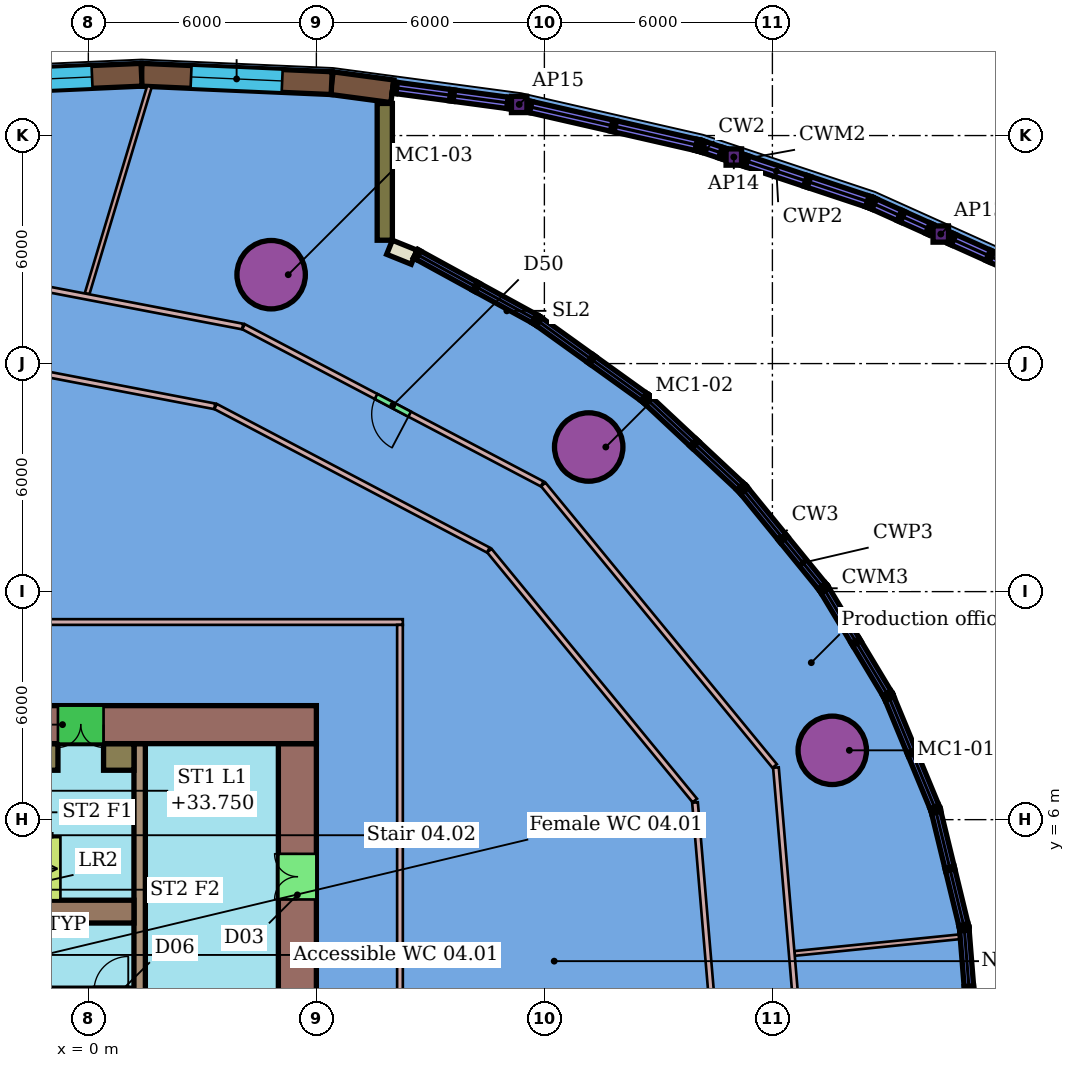
"""IFC4 building model, lengths in metres.
Left out: names, types, materials, properties, quantities, classifications, styles, units other than length and angle.
Written with IfcOpenShell. Run it as: python <this file> out.ifc"""

import sys

from ifc_helpers import new_model, si_unit, direction, frame, frame_2d, origin, origin_2d, place, context, subcontext, project, spatial, rectangle, hollow_circle, i_section, extrude, element, fill, save


model = new_model("IFC4")
c1 = context("Model", 3, precision=1e-05, world=origin(), true_north=direction((0.0, 1.0)))
c2 = subcontext(c1, "Body", "Model", "MODEL_VIEW")
j1 = project(units=[si_unit("LENGTHUNIT", "METRE"), si_unit("PLANEANGLEUNIT", "RADIAN")], contexts=[c1])
p1 = place(None, origin())
s1 = spatial("IfcSite", under=j1, at=p1, CompositionType="ELEMENT")
p2 = place(p1, origin())
s2 = spatial("IfcBuilding", under=s1, at=p2, CompositionType="ELEMENT")
p3 = place(p2, frame((0.0, 0.0, 31.5)))
s3 = spatial("IfcBuildingStorey", under=s2, at=p3, CompositionType="ELEMENT", Elevation=31.5)
for number, where, z_axis, x_axis in (
    (1, (19.575, 7.824, 0.0), (0.0, 0.0, 1.0), (1.0, 0.0, 0.0)),
    (2, (13.166, 15.805, 0.0), (0.0, 0.0, 1.0), (1.0, 0.0, 0.0)),
    (3, (4.81, 20.339, 0.0), (0.0, 0.0, 1.0), (1.0, 0.0, 0.0)),
):
    element("IfcColumn", number, at=place(p3, frame(where, z_axis=z_axis, x_axis=x_axis)), inside=s3, PredefinedType="COLUMN", context=c2, shape_type="SweptSolid", body=[
        extrude(hollow_circle(Radius=0.9, WallThickness=0.06, at=origin_2d()), origin(), (0.0, 0.0, 1.0), 4.35),
    ])
for number, where, z_axis, x_axis in (
    (4, (22.431, 21.409, 0.0), (0.0, 0.0, 1.0), (1.0, 0.0, 0.0)),
    (5, (16.985, 23.435, 0.0), (0.0, 0.0, 1.0), (1.0, 0.0, 0.0)),
    (6, (11.337, 24.819, 0.0), (0.0, 0.0, 1.0), (1.0, 0.0, 0.0)),
):
    element("IfcColumn", number, at=place(p3, frame(where, z_axis=z_axis, x_axis=x_axis)), inside=s3, PredefinedType="COLUMN", context=c2, shape_type="SweptSolid", body=[
        extrude(i_section(OverallWidth=0.407, OverallDepth=0.428, WebThickness=0.02, FlangeThickness=0.035, at=origin_2d()), origin(), (0.0, 0.0, 1.0), 4.35),
    ])
p4 = place(p3, frame((-18.075, 11.2, 0.0), z_axis=(0.0, 0.0, 1.0), x_axis=(1.0, 0.0, 0.0)))
e7 = element("IfcWall", 7, at=p4, inside=s3, PredefinedType="PARTITIONING", context=c2, shape_type="SweptSolid", body=[
    extrude(rectangle(XDim=26.35, YDim=0.15, at=frame_2d((13.175, 0.0))), origin(), (0.0, 0.0, 1.0), 3.9),
])
p5 = place(p3, frame((8.2, -13.105, 0.0), z_axis=(0.0, 0.0, 1.0), x_axis=(0.0, 1.0, 0.0)))
e8 = element("IfcWall", 8, at=p5, inside=s3, PredefinedType="PARTITIONING", context=c2, shape_type="SweptSolid", body=[
    extrude(rectangle(XDim=24.23, YDim=0.15, at=frame_2d((12.115, 0.0))), origin(), (0.0, 0.0, 1.0), 3.9),
])
p6 = place(p3, frame((-4.114, 18.298, 0.0), z_axis=(0.0, 0.0, 1.0), x_axis=(0.982205706766, -0.187808278828, 0.0)))
e9 = element("IfcWall", 9, at=p6, inside=s3, PredefinedType="PARTITIONING", context=c2, shape_type="SweptSolid", body=[
    extrude(rectangle(XDim=7.573, YDim=0.15, at=frame_2d((3.787, 0.0))), origin(), (0.0, 0.0, 1.0), 3.9),
])
p7 = place(p3, frame((3.348, 16.871, 0.0), z_axis=(0.0, 0.0, 1.0), x_axis=(0.884926057807, -0.465731545221, 0.0)))
e10 = element("IfcWall", 10, at=p7, inside=s3, PredefinedType="PARTITIONING", context=c2, shape_type="SweptSolid", body=[
    extrude(rectangle(XDim=8.111, YDim=0.15, at=frame_2d((4.055, 0.0))), origin(), (0.0, 0.0, 1.0), 3.9),
])
p8 = place(p3, frame((10.553, 13.079, 0.0), z_axis=(0.0, 0.0, 1.0), x_axis=(0.635033534221, -0.772484569694, 0.0)))
e11 = element("IfcWall", 11, at=p8, inside=s3, PredefinedType="PARTITIONING", context=c2, shape_type="SweptSolid", body=[
    extrude(rectangle(XDim=8.513, YDim=0.15, at=frame_2d((4.257, 0.0))), origin(), (0.0, 0.0, 1.0), 3.9),
])
p9 = place(p3, frame((15.963, 6.451, 0.0), z_axis=(0.0, 0.0, 1.0), x_axis=(0.084487276917, -0.996424558127, 0.0)))
e12 = element("IfcWall", 12, at=p9, inside=s3, PredefinedType="PARTITIONING", context=c2, shape_type="SweptSolid", body=[
    extrude(rectangle(XDim=8.366, YDim=0.15, at=frame_2d((4.183, 0.0))), origin(), (0.0, 0.0, 1.0), 3.9),
])
p10 = place(p3, frame((-0.033, 19.84, 0.0), z_axis=(0.0, 0.0, 1.0), x_axis=(0.288063986859, 0.957611162986, 0.0)))
e13 = element("IfcWall", 13, at=p10, inside=s3, PredefinedType="PARTITIONING", context=c2, shape_type="SweptSolid", body=[
    extrude(rectangle(XDim=5.692, YDim=0.125, at=frame_2d((2.846, 0.0))), origin(), (0.0, 0.0, 1.0), 3.9),
])
p11 = place(p3, frame((18.584, 2.48, 0.0), z_axis=(0.0, 0.0, 1.0), x_axis=(0.994950329661, 0.100368528474, 0.0)))
e14 = element("IfcWall", 14, at=p11, inside=s3, PredefinedType="PARTITIONING", context=c2, shape_type="SweptSolid", body=[
    extrude(rectangle(XDim=4.388, YDim=0.125, at=frame_2d((2.194, 0.0))), origin(), (0.0, 0.0, 1.0), 3.9),
])
p12 = place(p3, frame((18.093, 7.371, 0.0), z_axis=(0.0, 0.0, 1.0), x_axis=(0.084469905026, -0.996426030945, 0.0)))
e15 = element("IfcWall", 15, at=p12, inside=s3, PredefinedType="PARTITIONING", context=c2, shape_type="SweptSolid", body=[
    extrude(rectangle(XDim=9.801, YDim=0.15, at=frame_2d((4.9, 0.0))), origin(), (0.0, 0.0, 1.0), 3.9),
])
p13 = place(p3, frame((11.97, 14.819, 0.0), z_axis=(0.0, 0.0, 1.0), x_axis=(0.63502168635, -0.772494309277, 0.0)))
e16 = element("IfcWall", 16, at=p13, inside=s3, PredefinedType="PARTITIONING", context=c2, shape_type="SweptSolid", body=[
    extrude(rectangle(XDim=9.59, YDim=0.15, at=frame_2d((4.795, 0.0))), origin(), (0.0, 0.0, 1.0), 3.9),
])
p14 = place(p3, frame((11.942, 14.833, 0.0), z_axis=(0.0, 0.0, 1.0), x_axis=(-0.884920607371, 0.465741901326, 0.0)))
e17 = element("IfcWall", 17, at=p14, inside=s3, PredefinedType="PARTITIONING", context=c2, shape_type="SweptSolid", body=[
    extrude(rectangle(XDim=8.882, YDim=0.15, at=frame_2d((4.441, 0.0))), origin(), (0.0, 0.0, 1.0), 3.9),
])
p15 = place(p14, frame((3.941, 0.0, 0.0)))
e18 = element("IfcOpeningElement", 18, at=p15, cuts=e17, PredefinedType="OPENING", context=c2, shape_type="SweptSolid", body=[
    extrude(rectangle(XDim=1.0, YDim=2.1, at=frame_2d((0.5, 1.05))), frame((0.0, 0.085, 0.0), z_axis=(0.0, -1.0, 0.0), x_axis=(1.0, 0.0, 0.0)), (0.0, 0.0, 1.0), 0.17),
])
p16 = place(p3, frame((-4.028, 20.521, 0.0), z_axis=(0.0, 0.0, 1.0), x_axis=(0.982207009241, -0.187801466976, 0.0)))
e19 = element("IfcWall", 19, at=p16, inside=s3, PredefinedType="PARTITIONING", context=c2, shape_type="SweptSolid", body=[
    extrude(rectangle(XDim=8.234, YDim=0.15, at=frame_2d((4.117, 0.0))), origin(), (0.0, 0.0, 1.0), 3.9),
])
p17 = place(p3, frame((8.0, 25.165, 0.0), z_axis=(0.0, 0.0, 1.0), x_axis=(-0.991131029833, 0.132888230112, 0.0)))
e20 = element("IfcWall", 20, at=p17, inside=s3, PredefinedType="SOLIDWALL", context=c2, shape_type="SweptSolid", body=[
    extrude(rectangle(XDim=1.611, YDim=0.6, at=frame_2d((0.806, 0.0))), origin(), (0.0, 0.0, 1.0), 4.35),
])
p18 = place(p3, frame((6.403, 25.379, 0.0), z_axis=(0.0, 0.0, 1.0), x_axis=(-0.99902630841, 0.044118421369, 0.0)))
e21 = element("IfcWall", 21, at=p18, inside=s3, PredefinedType="SOLIDWALL", context=c2, shape_type="SweptSolid", body=[
    extrude(rectangle(XDim=5.008, YDim=0.6, at=frame_2d((2.504, 0.0))), origin(), (0.0, 0.0, 1.0), 4.35),
])
p19 = place(p18, frame((1.304, 0.0, 0.9)))
e22 = element("IfcOpeningElement", 22, at=p19, cuts=e21, PredefinedType="OPENING", context=c2, shape_type="SweptSolid", body=[
    extrude(rectangle(XDim=2.4, YDim=2.4, at=frame_2d((1.2, 1.2))), frame((0.0, 0.31, 0.0), z_axis=(0.0, -1.0, 0.0), x_axis=(1.0, 0.0, 0.0)), (0.0, 0.0, 1.0), 0.62),
])
p20 = place(p3, frame((1.4, 25.6, 0.0), z_axis=(0.0, 0.0, 1.0), x_axis=(-0.999026213515, -0.044120570136, 0.0)))
e23 = element("IfcWall", 23, at=p20, inside=s3, PredefinedType="SOLIDWALL", context=c2, shape_type="SweptSolid", body=[
    extrude(rectangle(XDim=5.008, YDim=0.6, at=frame_2d((2.504, 0.0))), origin(), (0.0, 0.0, 1.0), 4.35),
])
p21 = place(p20, frame((1.304, 0.0, 0.9)))
e24 = element("IfcOpeningElement", 24, at=p21, cuts=e23, PredefinedType="OPENING", context=c2, shape_type="SweptSolid", body=[
    extrude(rectangle(XDim=2.4, YDim=2.4, at=frame_2d((1.2, 1.2))), frame((0.0, 0.31, 0.0), z_axis=(0.0, -1.0, 0.0), x_axis=(1.0, 0.0, 0.0)), (0.0, 0.0, 1.0), 0.62),
])
p22 = place(p3, frame((7.925, 21.061, 0.0), z_axis=(0.0, 0.0, 1.0), x_axis=(0.927141159757, -0.374712249444, 0.0)))
e25 = element("IfcWall", 25, at=p22, inside=s3, PredefinedType="SOLIDWALL", context=c2, shape_type="SweptSolid", body=[
    extrude(rectangle(XDim=0.697, YDim=0.4, at=frame_2d((0.348, 0.0))), origin(), (0.0, 0.0, 1.0), 3.862),
])
p23 = place(p3, frame((7.8, 24.845, 0.0), z_axis=(0.0, 0.0, 1.0), x_axis=(0.0, -1.0, 0.0)))
e26 = element("IfcWall", 26, at=p23, inside=s3, PredefinedType="SOLIDWALL", context=c2, shape_type="SweptSolid", body=[
    extrude(rectangle(XDim=3.599, YDim=0.4, at=frame_2d((1.8, 0.0))), origin(), (0.0, 0.0, 1.0), 4.35),
])
p24 = place(p3, frame((6.0, 8.5, 0.0), z_axis=(0.0, 0.0, 1.0), x_axis=(-1.0, 0.0, 0.0)))
e27 = element("IfcWall", 27, at=p24, inside=s3, PredefinedType="SHEAR", context=c2, shape_type="SweptSolid", body=[
    extrude(rectangle(XDim=12.0, YDim=1.0, at=frame_2d((6.0, 0.0))), origin(), (0.0, 0.0, 1.0), 4.2),
])
p25 = place(p24, frame((5.6, 0.0, 0.0)))
e28 = element("IfcOpeningElement", 28, at=p25, cuts=e27, PredefinedType="OPENING", context=c2, shape_type="SweptSolid", body=[
    extrude(rectangle(XDim=1.2, YDim=2.1, at=frame_2d((0.6, 1.05))), frame((0.0, 0.51, 0.0), z_axis=(0.0, -1.0, 0.0), x_axis=(1.0, 0.0, 0.0)), (0.0, 0.0, 1.0), 1.02),
])
p26 = place(p3, frame((5.5, -8.0, 0.0), z_axis=(0.0, 0.0, 1.0), x_axis=(0.0, 1.0, 0.0)))
e29 = element("IfcWall", 29, at=p26, inside=s3, PredefinedType="SHEAR", context=c2, shape_type="SweptSolid", body=[
    extrude(rectangle(XDim=16.0, YDim=1.0, at=frame_2d((8.0, 0.0))), origin(), (0.0, 0.0, 1.0), 4.2),
])
p27 = place(p26, frame((2.9, 0.0, 0.0)))
e30 = element("IfcOpeningElement", 30, at=p27, cuts=e29, PredefinedType="OPENING", context=c2, shape_type="SweptSolid", body=[
    extrude(rectangle(XDim=1.2, YDim=2.1, at=frame_2d((0.6, 1.05))), frame((0.0, 0.51, 0.0), z_axis=(0.0, -1.0, 0.0), x_axis=(1.0, 0.0, 0.0)), (0.0, 0.0, 1.0), 1.02),
])
p28 = place(p26, frame((11.9, 0.0, 0.0)))
e31 = element("IfcOpeningElement", 31, at=p28, cuts=e29, PredefinedType="OPENING", context=c2, shape_type="SweptSolid", body=[
    extrude(rectangle(XDim=1.2, YDim=2.1, at=frame_2d((0.6, 1.05))), frame((0.0, 0.51, 0.0), z_axis=(0.0, -1.0, 0.0), x_axis=(1.0, 0.0, 0.0)), (0.0, 0.0, 1.0), 1.02),
])
p29 = place(p3, frame((-6.0, 3.58, 0.0), z_axis=(0.0, 0.0, 1.0), x_axis=(1.0, 0.0, 0.0)))
e32 = element("IfcWall", 32, at=p29, inside=s3, PredefinedType="SHEAR", context=c2, shape_type="SweptSolid", body=[
    extrude(rectangle(XDim=7.2, YDim=0.6, at=frame_2d((3.6, 0.0))), origin(), (0.0, 0.0, 1.0), 4.2),
])
p30 = place(p3, frame((1.35, -8.0, 0.0), z_axis=(0.0, 0.0, 1.0), x_axis=(0.0, 1.0, 0.0)))
e33 = element("IfcWall", 33, at=p30, inside=s3, PredefinedType="SHEAR", context=c2, shape_type="SweptSolid", body=[
    extrude(rectangle(XDim=16.0, YDim=0.3, at=frame_2d((8.0, 0.0))), origin(), (0.0, 0.0, 1.0), 4.2),
])
p31 = place(p30, frame((1.91, 0.0, 0.0)))
e34 = element("IfcOpeningElement", 34, at=p31, cuts=e33, PredefinedType="OPENING", context=c2, shape_type="SweptSolid", body=[
    extrude(rectangle(XDim=1.0, YDim=2.1, at=frame_2d((0.5, 1.05))), frame((0.0, 0.16, 0.0), z_axis=(0.0, -1.0, 0.0), x_axis=(1.0, 0.0, 0.0)), (0.0, 0.0, 1.0), 0.32),
])
p32 = place(p30, frame((7.25, 0.0, 0.0)))
e35 = element("IfcOpeningElement", 35, at=p32, cuts=e33, PredefinedType="OPENING", context=c2, shape_type="SweptSolid", body=[
    extrude(rectangle(XDim=1.5, YDim=2.1, at=frame_2d((0.75, 1.05))), frame((0.0, 0.16, 0.0), z_axis=(0.0, -1.0, 0.0), x_axis=(1.0, 0.0, 0.0)), (0.0, 0.0, 1.0), 0.32),
])
p33 = place(p3, frame((-13.2, 1.5, 0.0), z_axis=(0.0, 0.0, 1.0), x_axis=(1.0, 0.0, 0.0)))
e36 = element("IfcWall", 36, at=p33, inside=s3, PredefinedType="SHEAR", context=c2, shape_type="SweptSolid", body=[
    extrude(rectangle(XDim=14.4, YDim=0.2, at=frame_2d((7.2, 0.0))), origin(), (0.0, 0.0, 1.0), 4.2),
])
p34 = place(p33, frame((0.546, 0.0, 0.0)))
e37 = element("IfcOpeningElement", 37, at=p34, cuts=e36, PredefinedType="OPENING", context=c2, shape_type="SweptSolid", body=[
    extrude(rectangle(XDim=1.1, YDim=2.1, at=frame_2d((0.55, 1.05))), frame((0.0, 0.11, 0.0), z_axis=(0.0, -1.0, 0.0), x_axis=(1.0, 0.0, 0.0)), (0.0, 0.0, 1.0), 0.22),
])
p35 = place(p33, frame((2.988, 0.0, 0.0)))
e38 = element("IfcOpeningElement", 38, at=p35, cuts=e36, PredefinedType="OPENING", context=c2, shape_type="SweptSolid", body=[
    extrude(rectangle(XDim=1.1, YDim=2.1, at=frame_2d((0.55, 1.05))), frame((0.0, 0.11, 0.0), z_axis=(0.0, -1.0, 0.0), x_axis=(1.0, 0.0, 0.0)), (0.0, 0.0, 1.0), 0.22),
])
p36 = place(p33, frame((5.429, 0.0, 0.0)))
e39 = element("IfcOpeningElement", 39, at=p36, cuts=e36, PredefinedType="OPENING", context=c2, shape_type="SweptSolid", body=[
    extrude(rectangle(XDim=1.1, YDim=2.1, at=frame_2d((0.55, 1.05))), frame((0.0, 0.11, 0.0), z_axis=(0.0, -1.0, 0.0), x_axis=(1.0, 0.0, 0.0)), (0.0, 0.0, 1.0), 0.22),
])
p37 = place(p33, frame((7.871, 0.0, 0.0)))
e40 = element("IfcOpeningElement", 40, at=p37, cuts=e36, PredefinedType="OPENING", context=c2, shape_type="SweptSolid", body=[
    extrude(rectangle(XDim=1.1, YDim=2.1, at=frame_2d((0.55, 1.05))), frame((0.0, 0.11, 0.0), z_axis=(0.0, -1.0, 0.0), x_axis=(1.0, 0.0, 0.0)), (0.0, 0.0, 1.0), 0.22),
])
p38 = place(p33, frame((10.21, 0.0, 0.0)))
e41 = element("IfcOpeningElement", 41, at=p38, cuts=e36, PredefinedType="OPENING", context=c2, shape_type="SweptSolid", body=[
    extrude(rectangle(XDim=1.0, YDim=2.1, at=frame_2d((0.5, 1.05))), frame((0.0, 0.11, 0.0), z_axis=(0.0, -1.0, 0.0), x_axis=(1.0, 0.0, 0.0)), (0.0, 0.0, 1.0), 0.22),
])
p39 = place(p33, frame((13.35, 0.0, 0.0)))
e42 = element("IfcOpeningElement", 42, at=p39, cuts=e36, PredefinedType="OPENING", context=c2, shape_type="SweptSolid", body=[
    extrude(rectangle(XDim=0.9, YDim=2.1, at=frame_2d((0.45, 1.05))), frame((0.0, 0.11, 0.0), z_axis=(0.0, -1.0, 0.0), x_axis=(1.0, 0.0, 0.0)), (0.0, 0.0, 1.0), 0.22),
])
p40 = place(p3, frame((-5.85, 7.65, 0.0), z_axis=(0.0, 0.0, 1.0), x_axis=(1.0, 0.0, 0.0)))
e43 = element("IfcWall", 43, at=p40, inside=s3, PredefinedType="SHEAR", context=c2, shape_type="SweptSolid", body=[
    extrude(rectangle(XDim=5.05, YDim=0.7, at=frame_2d((2.525, 0.0))), origin(), (0.0, 0.0, 1.0), 4.2),
])
p41 = place(p3, frame((0.4, 7.65, 0.0), z_axis=(0.0, 0.0, 1.0), x_axis=(1.0, 0.0, 0.0)))
e44 = element("IfcWall", 44, at=p41, inside=s3, PredefinedType="SHEAR", context=c2, shape_type="SweptSolid", body=[
    extrude(rectangle(XDim=0.8, YDim=0.7, at=frame_2d((0.4, 0.0))), origin(), (0.0, 0.0, 1.0), 4.2),
])
p42 = place(p15, origin())
e45 = element("IfcDoor", 45, at=p42, inside=s3, OperationType="SINGLE_SWING_LEFT", PredefinedType="DOOR", context=c2, shape_type="SweptSolid", body=[
    extrude(rectangle(XDim=1.0, YDim=2.1, at=frame_2d((0.5, 1.05))), frame((0.0, 0.025, 0.0), z_axis=(0.0, -1.0, 0.0), x_axis=(1.0, 0.0, 0.0)), (0.0, 0.0, 1.0), 0.05),
])
fill(e18, e45)
p43 = place(p19, origin())
e46 = element("IfcWindow", 46, at=p43, inside=s3, PartitioningType="SINGLE_PANEL", PredefinedType="WINDOW", context=c2, shape_type="SweptSolid", body=[
    extrude(rectangle(XDim=2.4, YDim=2.4, at=frame_2d((1.2, 1.2))), frame((0.0, 0.03, 0.0), z_axis=(0.0, -1.0, 0.0), x_axis=(1.0, 0.0, 0.0)), (0.0, 0.0, 1.0), 0.06),
])
fill(e22, e46)
p44 = place(p21, origin())
e47 = element("IfcWindow", 47, at=p44, inside=s3, PartitioningType="SINGLE_PANEL", PredefinedType="WINDOW", context=c2, shape_type="SweptSolid", body=[
    extrude(rectangle(XDim=2.4, YDim=2.4, at=frame_2d((1.2, 1.2))), frame((0.0, 0.03, 0.0), z_axis=(0.0, -1.0, 0.0), x_axis=(1.0, 0.0, 0.0)), (0.0, 0.0, 1.0), 0.06),
])
fill(e24, e47)
p45 = place(p25, origin())
e48 = element("IfcDoor", 48, at=p45, inside=s3, OperationType="DOUBLE_DOOR_SINGLE_SWING", PredefinedType="NOTDEFINED", context=c2, shape_type="SweptSolid", body=[
    extrude(rectangle(XDim=1.2, YDim=2.1, at=frame_2d((0.6, 1.05))), frame((0.0, 0.025, 0.0), z_axis=(0.0, -1.0, 0.0), x_axis=(1.0, 0.0, 0.0)), (0.0, 0.0, 1.0), 0.05),
])
fill(e28, e48)
p46 = place(p28, origin())
e49 = element("IfcDoor", 49, at=p46, inside=s3, OperationType="DOUBLE_DOOR_SINGLE_SWING", PredefinedType="NOTDEFINED", context=c2, shape_type="SweptSolid", body=[
    extrude(rectangle(XDim=1.2, YDim=2.1, at=frame_2d((0.6, 1.05))), frame((0.0, 0.025, 0.0), z_axis=(0.0, -1.0, 0.0), x_axis=(1.0, 0.0, 0.0)), (0.0, 0.0, 1.0), 0.05),
])
fill(e31, e49)
save(model, sys.argv[1])
